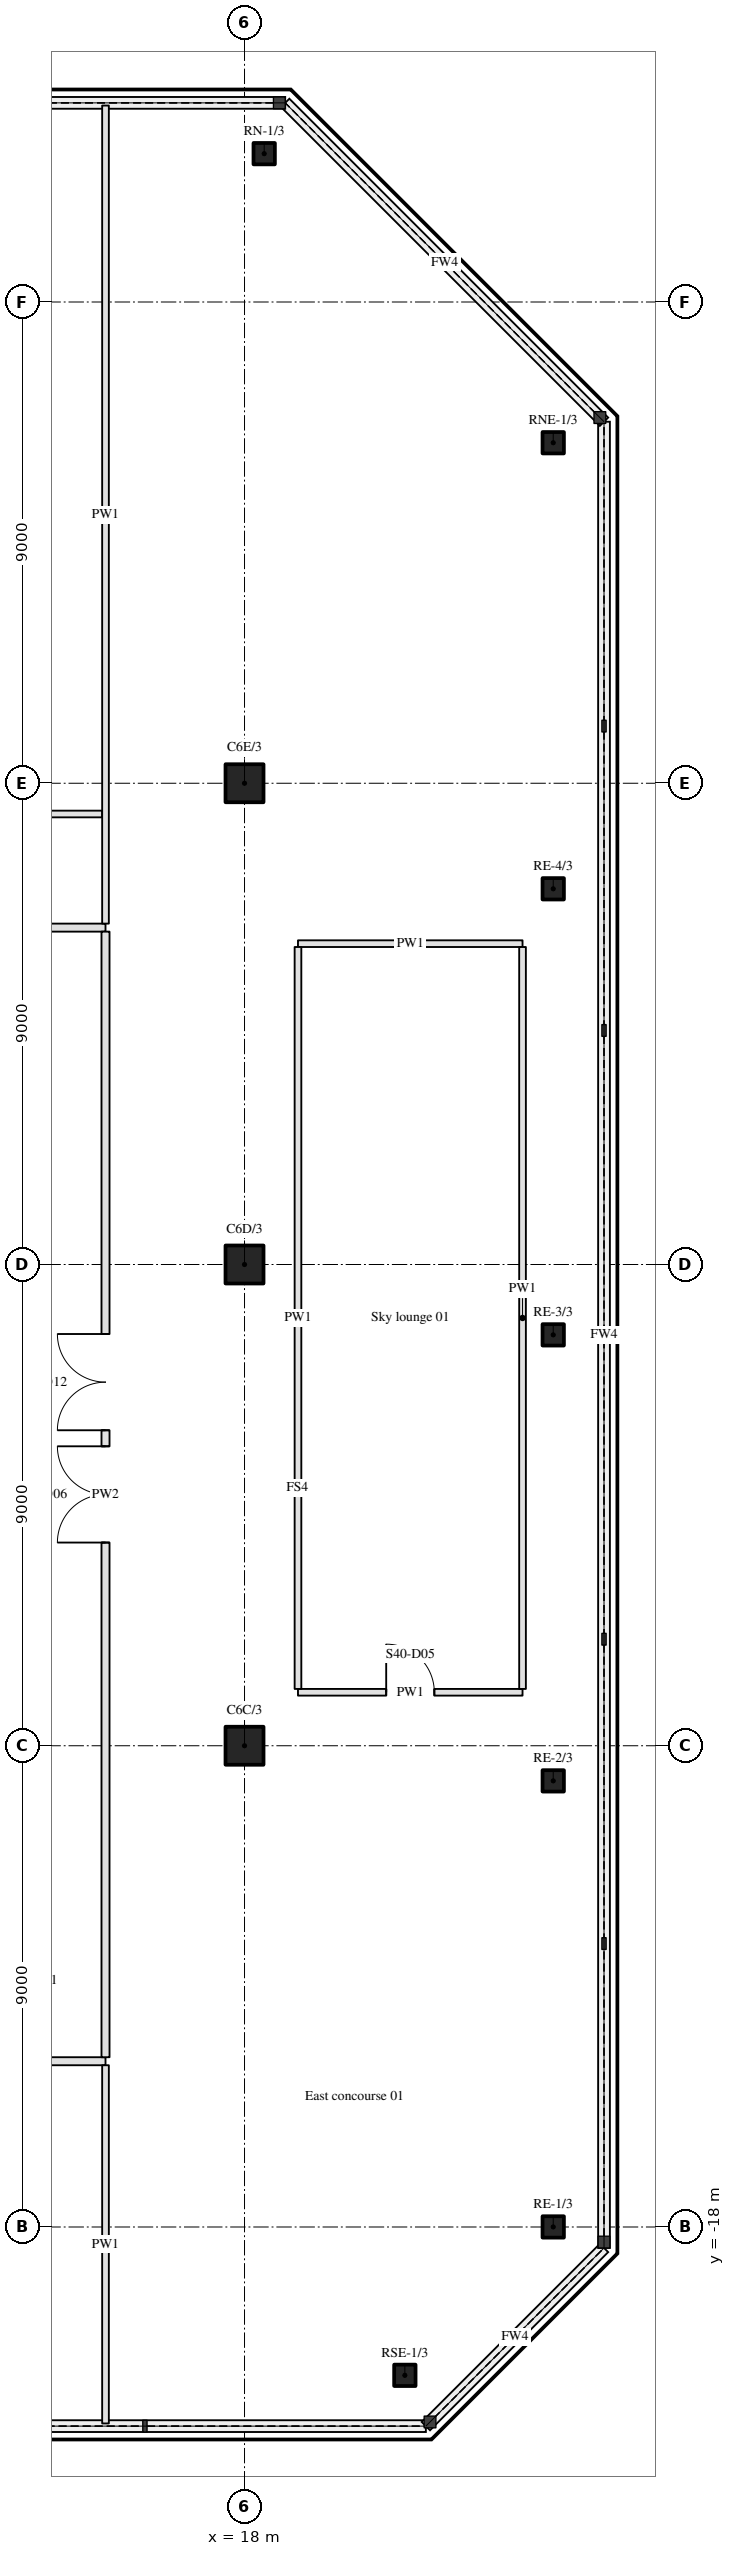
"""IFC4 building model, lengths in metres.
Left out: names, types, materials, properties, quantities, classifications, styles, units other than length and angle.
Written with IfcOpenShell. Run it as: python <this file> out.ifc"""

import sys

from ifc_helpers import new_model, si_unit, direction, frame, frame_2d, origin, origin_2d, place, context, subcontext, project, spatial, rectangle, hollow_rectangle, hollow_circle, extrude, element, fill, save


model = new_model("IFC4")
c1 = context("Model", 3, precision=1e-05, world=origin(), true_north=direction((0.0, 1.0)))
c2 = subcontext(c1, "Body", "Model", "MODEL_VIEW")
j1 = project(units=[si_unit("LENGTHUNIT", "METRE"), si_unit("PLANEANGLEUNIT", "RADIAN")], contexts=[c1])
p1 = place(None, origin())
s1 = spatial("IfcSite", under=j1, at=p1, CompositionType="ELEMENT")
p2 = place(p1, origin())
s2 = spatial("IfcBuilding", under=s1, at=p2, CompositionType="ELEMENT")
p3 = place(p2, frame((0.0, 0.0, 162.3)))
s3 = spatial("IfcBuildingStorey", under=s2, at=p3, CompositionType="ELEMENT", Elevation=162.3)
for number, where, z_axis, x_axis in (
    (1, (18.0, -9.0, 0.0), (0.0, 0.0, 1.0), (1.0, 0.0, 0.0)),
    (2, (18.0, 0.0, 0.0), (0.0, 0.0, 1.0), (1.0, 0.0, 0.0)),
    (3, (18.0, 9.0, 0.0), (0.0, 0.0, 1.0), (1.0, 0.0, 0.0)),
):
    element("IfcColumn", number, at=place(p3, frame(where, z_axis=z_axis, x_axis=x_axis)), inside=s3, PredefinedType="COLUMN", context=c2, shape_type="SweptSolid", body=[
        extrude(hollow_circle(Radius=0.355, WallThickness=0.032, at=origin_2d()), origin(), (0.0, 0.0, 1.0), 5.4),
    ])
for number, where, z_axis, x_axis in (
    (4, (20.999, -20.774, 0.0), (0.0, 0.0, 1.0), (1.0, 0.0, 0.0)),
    (5, (23.774, -17.999, 0.0), (0.0, 0.0, 1.0), (1.0, 0.0, 0.0)),
    (6, (23.774, -9.657, 0.0), (0.0, 0.0, 1.0), (1.0, 0.0, 0.0)),
    (7, (23.774, -1.316, 0.0), (0.0, 0.0, 1.0), (1.0, 0.0, 0.0)),
    (8, (23.774, 7.026, 0.0), (0.0, 0.0, 1.0), (1.0, 0.0, 0.0)),
    (9, (23.774, 15.368, 0.0), (0.0, 0.0, 1.0), (1.0, 0.0, 0.0)),
    (10, (18.368, 20.774, 0.0), (0.0, 0.0, 1.0), (1.0, 0.0, 0.0)),
):
    element("IfcColumn", number, at=place(p3, frame(where, z_axis=z_axis, x_axis=x_axis)), inside=s3, PredefinedType="COLUMN", context=c2, shape_type="SweptSolid", body=[
        extrude(hollow_rectangle(XDim=0.4, YDim=0.4, WallThickness=0.02, InnerFilletRadius=0.03, OuterFilletRadius=0.05, at=origin_2d()), origin(), (0.0, 0.0, 1.0), 5.4),
    ])
p4 = place(p3, frame((-15.4, -14.9, 0.0), z_axis=(0.0, 0.0, 1.0), x_axis=(1.0, 0.0, 0.0)))
e11 = element("IfcWall", 11, at=p4, inside=s3, PredefinedType="PARTITIONING", context=c2, shape_type="SweptSolid", body=[
    extrude(rectangle(XDim=30.8, YDim=0.15, at=frame_2d((15.4, 0.0))), origin(), (0.0, 0.0, 1.0), 4.46),
])
p5 = place(p4, frame((14.5, 0.0, 0.0)))
e12 = element("IfcOpeningElement", 12, at=p5, cuts=e11, PredefinedType="OPENING", context=c2, shape_type="SweptSolid", body=[
    extrude(rectangle(XDim=1.8, YDim=2.1, at=frame_2d((0.9, 1.05))), frame((0.0, 0.085, 0.0), z_axis=(0.0, -1.0, 0.0), x_axis=(1.0, 0.0, 0.0)), (0.0, 0.0, 1.0), 0.17),
])
p6 = place(p4, frame((16.6, 0.0, 0.0)))
e13 = element("IfcOpeningElement", 13, at=p6, cuts=e11, PredefinedType="OPENING", context=c2, shape_type="SweptSolid", body=[
    extrude(rectangle(XDim=1.8, YDim=2.1, at=frame_2d((0.9, 1.05))), frame((0.0, 0.085, 0.0), z_axis=(0.0, -1.0, 0.0), x_axis=(1.0, 0.0, 0.0)), (0.0, 0.0, 1.0), 0.17),
])
p7 = place(p3, frame((19.0, -8.0, 0.0), z_axis=(0.0, 0.0, 1.0), x_axis=(1.0, 0.0, 0.0)))
e14 = element("IfcWall", 14, at=p7, inside=s3, PredefinedType="PARTITIONING", context=c2, shape_type="SweptSolid", body=[
    extrude(rectangle(XDim=4.2, YDim=0.125, at=frame_2d((2.1, 0.0))), origin(), (0.0, 0.0, 1.0), 4.46),
])
p8 = place(p7, frame((1.65, 0.0, 0.0)))
e15 = element("IfcOpeningElement", 15, at=p8, cuts=e14, PredefinedType="OPENING", context=c2, shape_type="SweptSolid", body=[
    extrude(rectangle(XDim=0.9, YDim=2.1, at=frame_2d((0.45, 1.05))), frame((0.0, 0.073, 0.0), z_axis=(0.0, -1.0, 0.0), x_axis=(1.0, 0.0, 0.0)), (0.0, 0.0, 1.0), 0.145),
])
p9 = place(p3, frame((19.0, 6.0, 0.0), z_axis=(0.0, 0.0, 1.0), x_axis=(1.0, 0.0, 0.0)))
e16 = element("IfcWall", 16, at=p9, inside=s3, PredefinedType="PARTITIONING", context=c2, shape_type="SweptSolid", body=[
    extrude(rectangle(XDim=4.2, YDim=0.125, at=frame_2d((2.1, 0.0))), origin(), (0.0, 0.0, 1.0), 4.46),
])
p10 = place(p3, frame((15.4, 6.3, 0.0), z_axis=(0.0, 0.0, 1.0), x_axis=(-1.0, 0.0, 0.0)))
e17 = element("IfcWall", 17, at=p10, inside=s3, PredefinedType="PARTITIONING", context=c2, shape_type="SweptSolid", body=[
    extrude(rectangle(XDim=15.95, YDim=0.15, at=frame_2d((7.975, 0.0))), origin(), (0.0, 0.0, 1.0), 4.46),
])
p11 = place(p10, frame((11.167, 0.0, 0.0)))
e18 = element("IfcOpeningElement", 18, at=p11, cuts=e17, PredefinedType="OPENING", context=c2, shape_type="SweptSolid", body=[
    extrude(rectangle(XDim=1.0, YDim=2.1, at=frame_2d((0.5, 1.05))), frame((0.0, 0.085, 0.0), z_axis=(0.0, -1.0, 0.0), x_axis=(1.0, 0.0, 0.0)), (0.0, 0.0, 1.0), 0.17),
])
p12 = place(p10, frame((14.475, 0.0, 0.0)))
e19 = element("IfcOpeningElement", 19, at=p12, cuts=e17, PredefinedType="OPENING", context=c2, shape_type="SweptSolid", body=[
    extrude(rectangle(XDim=1.0, YDim=2.1, at=frame_2d((0.5, 1.05))), frame((0.0, 0.085, 0.0), z_axis=(0.0, -1.0, 0.0), x_axis=(1.0, 0.0, 0.0)), (0.0, 0.0, 1.0), 0.17),
])
p13 = place(p10, frame((6.55, 0.0, 0.0)))
e20 = element("IfcOpeningElement", 20, at=p13, cuts=e17, PredefinedType="OPENING", context=c2, shape_type="SweptSolid", body=[
    extrude(rectangle(XDim=0.9, YDim=2.1, at=frame_2d((0.45, 1.05))), frame((0.0, 0.085, 0.0), z_axis=(0.0, -1.0, 0.0), x_axis=(1.0, 0.0, 0.0)), (0.0, 0.0, 1.0), 0.17),
])
p14 = place(p10, frame((1.884, 0.0, 0.0)))
e21 = element("IfcOpeningElement", 21, at=p14, cuts=e17, PredefinedType="OPENING", context=c2, shape_type="SweptSolid", body=[
    extrude(rectangle(XDim=0.9, YDim=2.1, at=frame_2d((0.45, 1.05))), frame((0.0, 0.085, 0.0), z_axis=(0.0, -1.0, 0.0), x_axis=(1.0, 0.0, 0.0)), (0.0, 0.0, 1.0), 0.17),
])
p15 = place(p3, frame((6.142, 8.425, 0.0), z_axis=(0.0, 0.0, 1.0), x_axis=(1.0, 0.0, 0.0)))
e22 = element("IfcWall", 22, at=p15, inside=s3, PredefinedType="PARTITIONING", context=c2, shape_type="SweptSolid", body=[
    extrude(rectangle(XDim=9.195, YDim=0.125, at=frame_2d((4.598, 0.0))), origin(), (0.0, 0.0, 1.0), 4.46),
])
p16 = place(p3, frame((15.4, -21.674, 0.0), z_axis=(0.0, 0.0, 1.0), x_axis=(0.0, 1.0, 0.0)))
e23 = element("IfcWall", 23, at=p16, inside=s3, PredefinedType="PARTITIONING", context=c2, shape_type="SweptSolid", body=[
    extrude(rectangle(XDim=6.699, YDim=0.125, at=frame_2d((3.35, 0.0))), origin(), (0.0, 0.0, 1.0), 4.46),
])
p17 = place(p3, frame((15.4, -14.825, 0.0), z_axis=(0.0, 0.0, 1.0), x_axis=(0.0, 1.0, 0.0)))
e24 = element("IfcWall", 24, at=p17, inside=s3, PredefinedType="PARTITIONING", context=c2, shape_type="SweptSolid", body=[
    extrude(rectangle(XDim=21.05, YDim=0.15, at=frame_2d((10.525, 0.0))), origin(), (0.0, 0.0, 1.0), 4.46),
])
p18 = place(p17, frame((9.625, 0.0, 0.0)))
e25 = element("IfcOpeningElement", 25, at=p18, cuts=e24, PredefinedType="OPENING", context=c2, shape_type="SweptSolid", body=[
    extrude(rectangle(XDim=1.8, YDim=2.1, at=frame_2d((0.9, 1.05))), frame((0.0, 0.085, 0.0), z_axis=(0.0, -1.0, 0.0), x_axis=(1.0, 0.0, 0.0)), (0.0, 0.0, 1.0), 0.17),
])
p19 = place(p17, frame((11.725, 0.0, 0.0)))
e26 = element("IfcOpeningElement", 26, at=p19, cuts=e24, PredefinedType="OPENING", context=c2, shape_type="SweptSolid", body=[
    extrude(rectangle(XDim=1.8, YDim=2.1, at=frame_2d((0.9, 1.05))), frame((0.0, 0.085, 0.0), z_axis=(0.0, -1.0, 0.0), x_axis=(1.0, 0.0, 0.0)), (0.0, 0.0, 1.0), 0.17),
])
p20 = place(p3, frame((15.4, 6.375, 0.0), z_axis=(0.0, 0.0, 1.0), x_axis=(0.0, 1.0, 0.0)))
e27 = element("IfcWall", 27, at=p20, inside=s3, PredefinedType="PARTITIONING", context=c2, shape_type="SweptSolid", body=[
    extrude(rectangle(XDim=15.299, YDim=0.125, at=frame_2d((7.649, 0.0))), origin(), (0.0, 0.0, 1.0), 4.46),
])
for number, where, z_axis, x_axis in (
    (28, (19.0, -7.938, 0.0), (0.0, 0.0, 1.0), (0.0, 1.0, 0.0)),
    (29, (23.2, -7.938, 0.0), (0.0, 0.0, 1.0), (0.0, 1.0, 0.0)),
):
    element("IfcWall", number, at=place(p3, frame(where, z_axis=z_axis, x_axis=x_axis)), inside=s3, PredefinedType="PARTITIONING", context=c2, shape_type="SweptSolid", body=[
        extrude(rectangle(XDim=13.875, YDim=0.125, at=frame_2d((6.938, 0.0))), origin(), (0.0, 0.0, 1.0), 4.46),
    ])
p21 = place(p18, origin())
e30 = element("IfcDoor", 30, at=p21, inside=s3, OperationType="DOUBLE_DOOR_SINGLE_SWING", PredefinedType="DOOR", context=c2, shape_type="SweptSolid", body=[
    extrude(rectangle(XDim=1.8, YDim=2.1, at=frame_2d((0.9, 1.05))), frame((0.0, 0.025, 0.0), z_axis=(0.0, -1.0, 0.0), x_axis=(1.0, 0.0, 0.0)), (0.0, 0.0, 1.0), 0.05),
])
fill(e25, e30)
p22 = place(p19, origin())
e31 = element("IfcDoor", 31, at=p22, inside=s3, OperationType="DOUBLE_DOOR_SINGLE_SWING", PredefinedType="DOOR", context=c2, shape_type="SweptSolid", body=[
    extrude(rectangle(XDim=1.8, YDim=2.1, at=frame_2d((0.9, 1.05))), frame((0.0, 0.025, 0.0), z_axis=(0.0, -1.0, 0.0), x_axis=(1.0, 0.0, 0.0)), (0.0, 0.0, 1.0), 0.05),
])
fill(e26, e31)
p23 = place(p8, origin())
e32 = element("IfcDoor", 32, at=p23, inside=s3, OperationType="SINGLE_SWING_LEFT", PredefinedType="DOOR", context=c2, shape_type="SweptSolid", body=[
    extrude(rectangle(XDim=0.9, YDim=2.1, at=frame_2d((0.45, 1.05))), frame((0.0, 0.025, 0.0), z_axis=(0.0, -1.0, 0.0), x_axis=(1.0, 0.0, 0.0)), (0.0, 0.0, 1.0), 0.05),
])
fill(e15, e32)
save(model, sys.argv[1])
